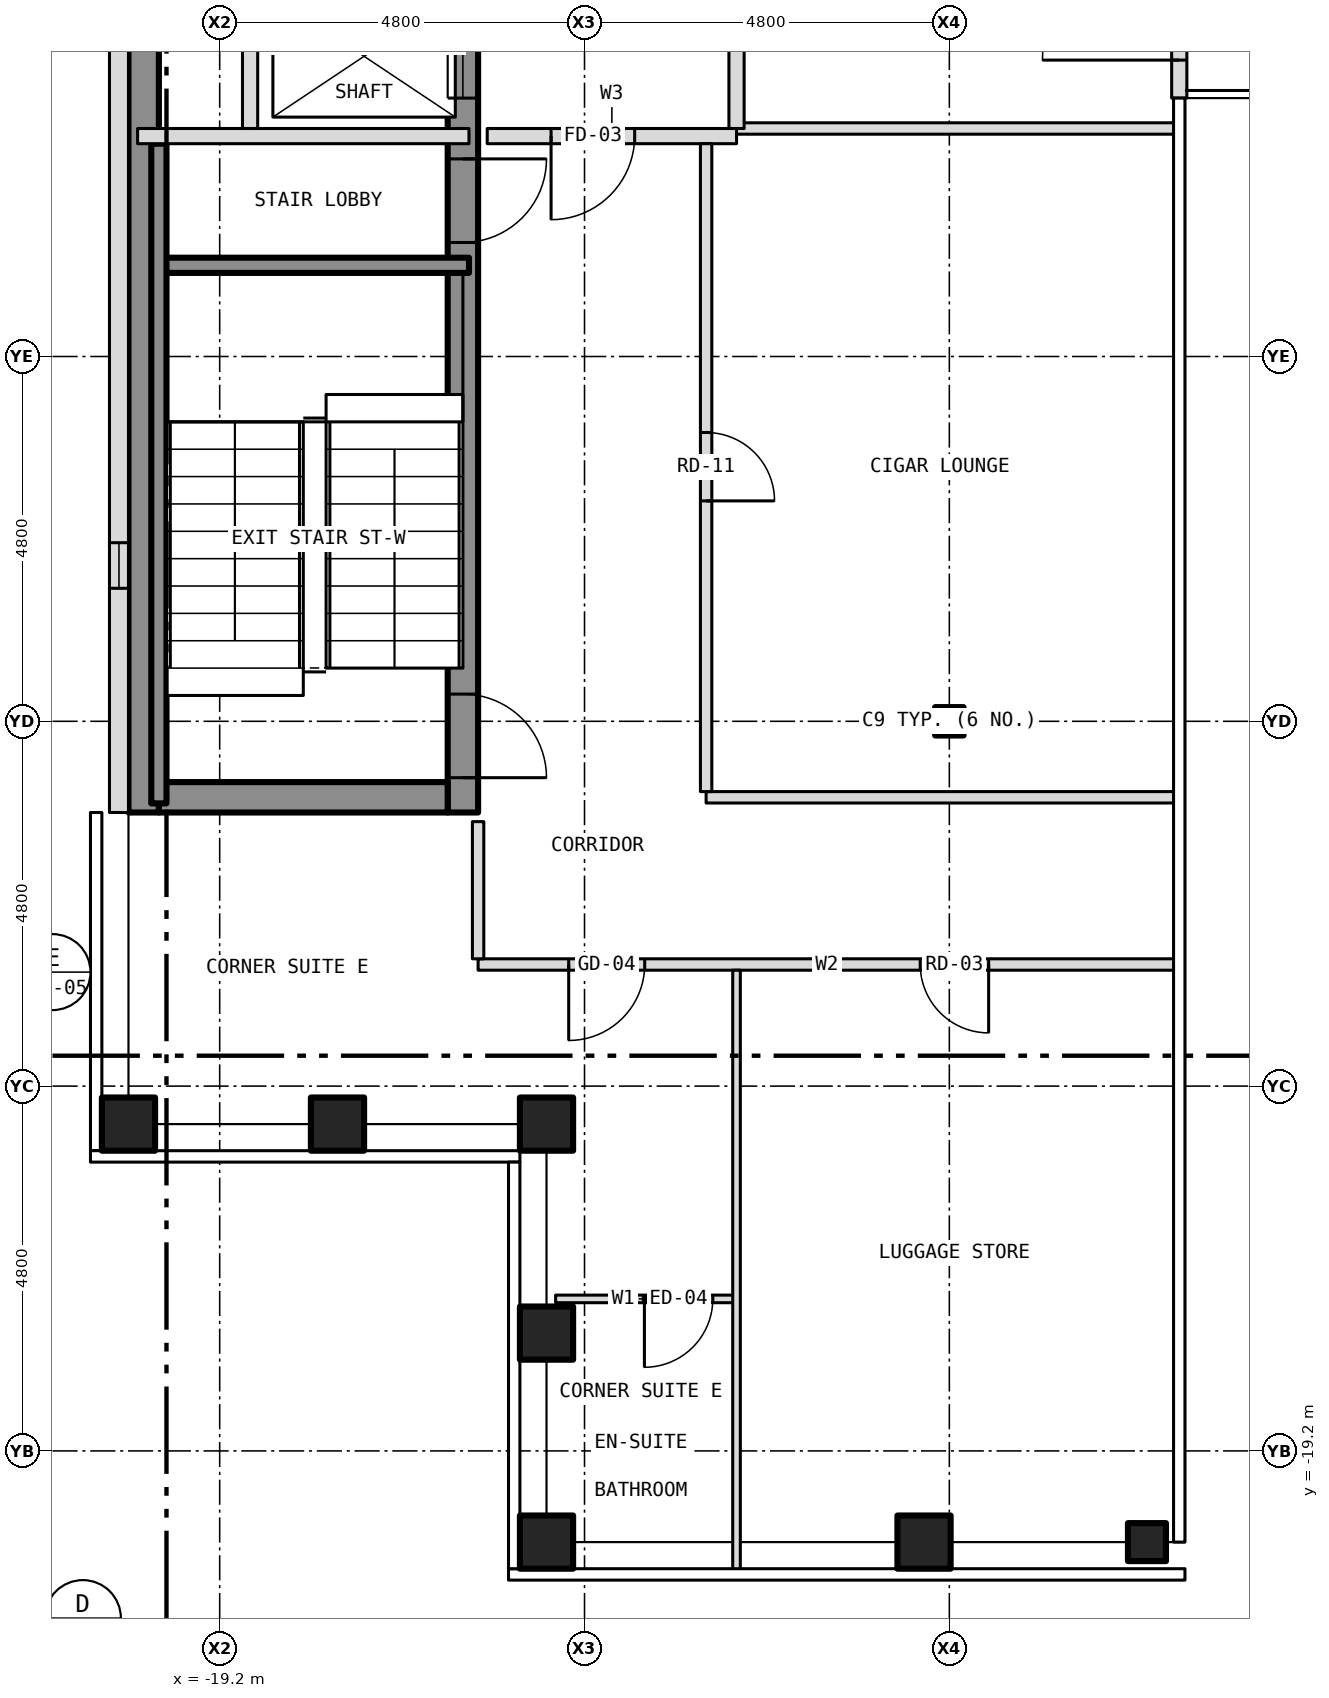
"""IFC4 building model, lengths in metres.
Left out: names, types, materials, properties, quantities, classifications, styles, units other than length and angle.
Written with IfcOpenShell. Run it as: python <this file> out.ifc"""

import sys

from ifc_helpers import new_model, si_unit, direction, frame, frame_2d, origin, origin_2d, place, context, subcontext, project, spatial, rectangle, hollow_rectangle, i_section, extrude, element, fill, save


model = new_model("IFC4")
c1 = context("Model", 3, precision=1e-05, world=origin(), true_north=direction((0.0, 1.0)))
c2 = subcontext(c1, "Body", "Model", "MODEL_VIEW")
j1 = project(units=[si_unit("LENGTHUNIT", "METRE"), si_unit("PLANEANGLEUNIT", "RADIAN")], contexts=[c1])
p1 = place(None, origin())
s1 = spatial("IfcSite", under=j1, at=p1, CompositionType="ELEMENT")
p2 = place(p1, origin())
s2 = spatial("IfcBuilding", under=s1, at=p2, CompositionType="ELEMENT")
p3 = place(p2, frame((0.0, 0.0, 229.5)))
s3 = spatial("IfcBuildingStorey", under=s2, at=p3, CompositionType="ELEMENT", Elevation=229.5)
for number, where, z_axis, x_axis in (
    (1, (-14.9, -20.4, -0.15), (0.0, 0.0, 1.0), (1.0, 0.0, 0.0)),
    (2, (-9.933, -20.4, -0.15), (0.0, 0.0, 1.0), (1.0, 0.0, 0.0)),
    (3, (-20.4, -14.9, -0.15), (0.0, 0.0, 1.0), (1.0, 0.0, 0.0)),
    (4, (-14.9, -14.9, -0.15), (0.0, 0.0, 1.0), (1.0, 0.0, 0.0)),
    (5, (-14.9, -17.65, -0.15), (0.0, 0.0, 1.0), (1.0, 0.0, 0.0)),
    (6, (-17.65, -14.9, -0.15), (0.0, 0.0, 1.0), (1.0, 0.0, 0.0)),
):
    element("IfcColumn", number, at=place(p3, frame(where, z_axis=z_axis, x_axis=x_axis)), inside=s3, PredefinedType="COLUMN", context=c2, shape_type="SweptSolid", body=[
        extrude(hollow_rectangle(XDim=0.7, YDim=0.7, WallThickness=0.04, at=origin_2d()), origin(), (0.0, 0.0, 1.0), 3.5),
    ])
p4 = place(p3, frame((-7.0, -20.4, -0.15), z_axis=(0.0, 0.0, 1.0), x_axis=(1.0, 0.0, 0.0)))
e7 = element("IfcColumn", 7, at=p4, inside=s3, PredefinedType="COLUMN", context=c2, shape_type="SweptSolid", body=[
    extrude(hollow_rectangle(XDim=0.5, YDim=0.5, WallThickness=0.03, at=origin_2d()), origin(), (0.0, 0.0, 1.0), 3.5),
])
p5 = place(p3, frame((-9.6, -9.6, -0.15), z_axis=(0.0, 0.0, 1.0), x_axis=(1.0, 0.0, 0.0)))
e8 = element("IfcColumn", 8, at=p5, inside=s3, PredefinedType="COLUMN", context=c2, shape_type="SweptSolid", body=[
    extrude(i_section(OverallWidth=0.373, OverallDepth=0.373, WebThickness=0.016, FlangeThickness=0.026, at=origin_2d()), origin(), (0.0, 0.0, 1.0), 3.5),
])
p6 = place(p3, frame((-16.0, -10.8, 0.0), z_axis=(0.0, 0.0, 1.0), x_axis=(0.0, 1.0, 0.0)))
e9 = element("IfcWall", 9, at=p6, inside=s3, PredefinedType="SHEAR", context=c2, shape_type="SweptSolid", body=[
    extrude(rectangle(XDim=21.6, YDim=0.4, at=frame_2d((10.8, 0.0))), origin(), (0.0, 0.0, 1.0), 3.25),
])
p7 = place(p6, frame((9.4, 0.0, 0.0)))
e10 = element("IfcOpeningElement", 10, at=p7, cuts=e9, PredefinedType="OPENING", context=c2, shape_type="SweptSolid", body=[
    extrude(rectangle(XDim=1.1, YDim=2.1, at=frame_2d((0.55, 1.05))), frame((0.0, 0.212, 0.0), z_axis=(0.0, -1.0, 0.0), x_axis=(1.0, 0.0, 0.0)), (0.0, 0.0, 1.0), 0.424),
])
p8 = place(p6, frame((11.5, 0.0, 0.0)))
e11 = element("IfcOpeningElement", 11, at=p8, cuts=e9, PredefinedType="OPENING", context=c2, shape_type="SweptSolid", body=[
    extrude(rectangle(XDim=1.1, YDim=2.1, at=frame_2d((0.55, 1.05))), frame((0.0, 0.212, 0.0), z_axis=(0.0, -1.0, 0.0), x_axis=(1.0, 0.0, 0.0)), (0.0, 0.0, 1.0), 0.424),
])
p9 = place(p6, frame((13.6, 0.0, 0.0)))
e12 = element("IfcOpeningElement", 12, at=p9, cuts=e9, PredefinedType="OPENING", context=c2, shape_type="SweptSolid", body=[
    extrude(rectangle(XDim=1.1, YDim=2.1, at=frame_2d((0.55, 1.05))), frame((0.0, 0.212, 0.0), z_axis=(0.0, -1.0, 0.0), x_axis=(1.0, 0.0, 0.0)), (0.0, 0.0, 1.0), 0.424),
])
p10 = place(p6, frame((15.7, 0.0, 0.0)))
e13 = element("IfcOpeningElement", 13, at=p10, cuts=e9, PredefinedType="OPENING", context=c2, shape_type="SweptSolid", body=[
    extrude(rectangle(XDim=1.1, YDim=2.1, at=frame_2d((0.55, 1.05))), frame((0.0, 0.212, 0.0), z_axis=(0.0, -1.0, 0.0), x_axis=(1.0, 0.0, 0.0)), (0.0, 0.0, 1.0), 0.424),
])
p11 = place(p6, frame((17.8, 0.0, 0.0)))
e14 = element("IfcOpeningElement", 14, at=p11, cuts=e9, PredefinedType="OPENING", context=c2, shape_type="SweptSolid", body=[
    extrude(rectangle(XDim=1.1, YDim=2.1, at=frame_2d((0.55, 1.05))), frame((0.0, 0.212, 0.0), z_axis=(0.0, -1.0, 0.0), x_axis=(1.0, 0.0, 0.0)), (0.0, 0.0, 1.0), 0.424),
])
p12 = place(p6, frame((0.458, 0.0, 0.0)))
e15 = element("IfcOpeningElement", 15, at=p12, cuts=e9, PredefinedType="OPENING", context=c2, shape_type="SweptSolid", body=[
    extrude(rectangle(XDim=1.1, YDim=2.1, at=frame_2d((0.55, 1.05))), frame((0.0, 0.212, 0.0), z_axis=(0.0, -1.0, 0.0), x_axis=(1.0, 0.0, 0.0)), (0.0, 0.0, 1.0), 0.424),
])
p13 = place(p6, frame((7.5, 0.0, 0.0)))
e16 = element("IfcOpeningElement", 16, at=p13, cuts=e9, PredefinedType="OPENING", context=c2, shape_type="SweptSolid", body=[
    extrude(rectangle(XDim=1.1, YDim=2.1, at=frame_2d((0.55, 1.05))), frame((0.0, 0.212, 0.0), z_axis=(0.0, -1.0, 0.0), x_axis=(1.0, 0.0, 0.0)), (0.0, 0.0, 1.0), 0.424),
])
p14 = place(p6, frame((20.0, 0.0, 0.0)))
e17 = element("IfcOpeningElement", 17, at=p14, cuts=e9, PredefinedType="OPENING", context=c2, shape_type="SweptSolid", body=[
    extrude(rectangle(XDim=0.9, YDim=2.1, at=frame_2d((0.45, 1.05))), frame((0.0, 0.212, 0.0), z_axis=(0.0, -1.0, 0.0), x_axis=(1.0, 0.0, 0.0)), (0.0, 0.0, 1.0), 0.424),
])
p15 = place(p3, frame((-20.2, -10.8, 0.0), z_axis=(0.0, 0.0, 1.0), x_axis=(0.0, 1.0, 0.0)))
e18 = element("IfcWall", 18, at=p15, inside=s3, PredefinedType="SHEAR", context=c2, shape_type="SweptSolid", body=[
    extrude(rectangle(XDim=21.6, YDim=0.4, at=frame_2d((10.8, 0.0))), origin(), (0.0, 0.0, 1.0), 3.25),
])
p16 = place(p3, frame((-20.0, -10.6, 0.0), z_axis=(0.0, 0.0, 1.0), x_axis=(1.0, 0.0, 0.0)))
e19 = element("IfcWall", 19, at=p16, inside=s3, PredefinedType="SHEAR", context=c2, shape_type="SweptSolid", body=[
    extrude(rectangle(XDim=3.8, YDim=0.4, at=frame_2d((1.9, 0.0))), origin(), (0.0, 0.0, 1.0), 3.25),
])
p17 = place(p3, frame((-20.525, 10.8, 0.0), z_axis=(0.0, 0.0, 1.0), x_axis=(0.0, -1.0, 0.0)))
e20 = element("IfcWall", 20, at=p17, inside=s3, PredefinedType="SOLIDWALL", context=c2, shape_type="SweptSolid", body=[
    extrude(rectangle(XDim=21.6, YDim=0.25, at=frame_2d((10.8, 0.0))), origin(), (0.0, 0.0, 1.0), 3.5),
])
p18 = place(p17, frame((18.05, 0.0, 1.0)))
e21 = element("IfcOpeningElement", 21, at=p18, cuts=e20, PredefinedType="OPENING", context=c2, shape_type="SweptSolid", body=[
    extrude(rectangle(XDim=0.6, YDim=1.5, at=frame_2d((0.3, 0.75))), frame((0.0, 0.137, 0.0), z_axis=(0.0, -1.0, 0.0), x_axis=(1.0, 0.0, 0.0)), (0.0, 0.0, 1.0), 0.274),
])
p19 = place(p3, frame((-6.575, -1.4, 0.0), z_axis=(0.0, 0.0, 1.0), x_axis=(0.0, 1.0, 0.0)))
e22 = element("IfcWall", 22, at=p19, inside=s3, PredefinedType="SOLIDWALL", context=c2, shape_type="SweptSolid", body=[
    extrude(rectangle(XDim=2.8, YDim=0.2, at=frame_2d((1.4, 0.0))), origin(), (0.0, 0.0, 1.0), 3.5),
])
p20 = place(p19, frame((0.5, 0.0, 0.0)))
e23 = element("IfcOpeningElement", 23, at=p20, cuts=e22, PredefinedType="OPENING", context=c2, shape_type="SweptSolid", body=[
    extrude(rectangle(XDim=1.8, YDim=2.1, at=frame_2d((0.9, 1.05))), frame((0.0, 0.112, 0.0), z_axis=(0.0, -1.0, 0.0), x_axis=(1.0, 0.0, 0.0)), (0.0, 0.0, 1.0), 0.224),
])
p21 = place(p3, frame((-14.78, -17.2, 0.0), z_axis=(0.0, 0.0, 1.0), x_axis=(1.0, 0.0, 0.0)))
e24 = element("IfcWall", 24, at=p21, inside=s3, PredefinedType="PARTITIONING", context=c2, shape_type="SweptSolid", body=[
    extrude(rectangle(XDim=2.38, YDim=0.1, at=frame_2d((1.19, 0.0))), origin(), (0.0, 0.0, 1.0), 3.35),
])
p22 = place(p21, frame((1.168, 0.0, 0.0)))
e25 = element("IfcOpeningElement", 25, at=p22, cuts=e24, PredefinedType="OPENING", context=c2, shape_type="SweptSolid", body=[
    extrude(rectangle(XDim=0.9, YDim=2.1, at=frame_2d((0.45, 1.05))), frame((0.0, 0.062, 0.0), z_axis=(0.0, -1.0, 0.0), x_axis=(1.0, 0.0, 0.0)), (0.0, 0.0, 1.0), 0.124),
])
p23 = place(p3, frame((-15.8, -12.8, 0.0), z_axis=(0.0, 0.0, 1.0), x_axis=(1.0, 0.0, 0.0)))
e26 = element("IfcWall", 26, at=p23, inside=s3, PredefinedType="PARTITIONING", context=c2, shape_type="SweptSolid", body=[
    extrude(rectangle(XDim=9.18, YDim=0.15, at=frame_2d((4.59, 0.0))), origin(), (0.0, 0.0, 1.0), 3.35),
])
p24 = place(p23, frame((5.817, 0.0, 0.0)))
e27 = element("IfcOpeningElement", 27, at=p24, cuts=e26, PredefinedType="OPENING", context=c2, shape_type="SweptSolid", body=[
    extrude(rectangle(XDim=0.9, YDim=2.1, at=frame_2d((0.45, 1.05))), frame((0.0, 0.087, 0.0), z_axis=(0.0, -1.0, 0.0), x_axis=(1.0, 0.0, 0.0)), (0.0, 0.0, 1.0), 0.174),
])
p25 = place(p23, frame((1.192, 0.0, 0.0)))
e28 = element("IfcOpeningElement", 28, at=p25, cuts=e26, PredefinedType="OPENING", context=c2, shape_type="SweptSolid", body=[
    extrude(rectangle(XDim=1.0, YDim=2.1, at=frame_2d((0.5, 1.05))), frame((0.0, 0.087, 0.0), z_axis=(0.0, -1.0, 0.0), x_axis=(1.0, 0.0, 0.0)), (0.0, 0.0, 1.0), 0.174),
])
p26 = place(p3, frame((-12.8, -10.6, 0.0), z_axis=(0.0, 0.0, 1.0), x_axis=(1.0, 0.0, 0.0)))
e29 = element("IfcWall", 29, at=p26, inside=s3, PredefinedType="PARTITIONING", context=c2, shape_type="SweptSolid", body=[
    extrude(rectangle(XDim=6.18, YDim=0.15, at=frame_2d((3.09, 0.0))), origin(), (0.0, 0.0, 1.0), 3.35),
])
p27 = place(p3, frame((-20.0, -3.6, 0.0), z_axis=(0.0, 0.0, 1.0), x_axis=(1.0, 0.0, 0.0)))
e30 = element("IfcWall", 30, at=p27, inside=s3, PredefinedType="SHEAR", context=c2, shape_type="SweptSolid", body=[
    extrude(rectangle(XDim=4.08, YDim=0.2, at=frame_2d((2.04, 0.0))), origin(), (0.0, 0.0, 1.0), 3.25),
])
p28 = place(p3, frame((-20.28, -1.9, 0.0), z_axis=(0.0, 0.0, 1.0), x_axis=(1.0, 0.0, 0.0)))
e31 = element("IfcWall", 31, at=p28, inside=s3, PredefinedType="PARTITIONING", context=c2, shape_type="SweptSolid", body=[
    extrude(rectangle(XDim=4.36, YDim=0.2, at=frame_2d((2.18, 0.0))), origin(), (0.0, 0.0, 1.0), 3.25),
])
p29 = place(p3, frame((-15.68, -1.9, 0.0), z_axis=(0.0, 0.0, 1.0), x_axis=(1.0, 0.0, 0.0)))
e32 = element("IfcWall", 32, at=p29, inside=s3, PredefinedType="PARTITIONING", context=c2, shape_type="SweptSolid", body=[
    extrude(rectangle(XDim=3.28, YDim=0.2, at=frame_2d((1.64, 0.0))), origin(), (0.0, 0.0, 1.0), 3.35),
])
p30 = place(p29, frame((0.84, 0.0, 0.0)))
e33 = element("IfcOpeningElement", 33, at=p30, cuts=e32, PredefinedType="OPENING", context=c2, shape_type="SweptSolid", body=[
    extrude(rectangle(XDim=1.1, YDim=2.1, at=frame_2d((0.55, 1.05))), frame((0.0, 0.112, 0.0), z_axis=(0.0, -1.0, 0.0), x_axis=(1.0, 0.0, 0.0)), (0.0, 0.0, 1.0), 0.224),
])
p31 = place(p3, frame((-12.4, -1.8, 0.0), z_axis=(0.0, 0.0, 1.0), x_axis=(1.0, 0.0, 0.0)))
e34 = element("IfcWall", 34, at=p31, inside=s3, PredefinedType="PARTITIONING", context=c2, shape_type="SweptSolid", body=[
    extrude(rectangle(XDim=5.78, YDim=0.15, at=frame_2d((2.89, 0.0))), origin(), (0.0, 0.0, 1.0), 3.35),
])
p32 = place(p3, frame((-20.0, -10.68, 0.0), z_axis=(0.0, 0.0, 1.0), x_axis=(0.0, 1.0, 0.0)))
e35 = element("IfcWall", 35, at=p32, inside=s3, PredefinedType="SHEAR", context=c2, shape_type="SweptSolid", body=[
    extrude(rectangle(XDim=8.68, YDim=0.2, at=frame_2d((4.34, 0.0))), origin(), (0.0, 0.0, 1.0), 3.25),
])
p33 = place(p3, frame((-18.8, -1.8, 0.0), z_axis=(0.0, 0.0, 1.0), x_axis=(0.0, 1.0, 0.0)))
e36 = element("IfcWall", 36, at=p33, inside=s3, PredefinedType="PARTITIONING", context=c2, shape_type="SweptSolid", body=[
    extrude(rectangle(XDim=12.48, YDim=0.2, at=frame_2d((6.24, 0.0))), origin(), (0.0, 0.0, 1.0), 3.25),
])
p34 = place(p3, frame((-15.8, -12.725, 0.0), z_axis=(0.0, 0.0, 1.0), x_axis=(0.0, 1.0, 0.0)))
e37 = element("IfcWall", 37, at=p34, inside=s3, PredefinedType="PARTITIONING", context=c2, shape_type="SweptSolid", body=[
    extrude(rectangle(XDim=1.805, YDim=0.15, at=frame_2d((0.903, 0.0))), origin(), (0.0, 0.0, 1.0), 3.35),
])
p35 = place(p3, frame((-12.8, -10.525, 0.0), z_axis=(0.0, 0.0, 1.0), x_axis=(0.0, 1.0, 0.0)))
e38 = element("IfcWall", 38, at=p35, inside=s3, PredefinedType="PARTITIONING", context=c2, shape_type="SweptSolid", body=[
    extrude(rectangle(XDim=8.525, YDim=0.15, at=frame_2d((4.262, 0.0))), origin(), (0.0, 0.0, 1.0), 3.35),
])
p36 = place(p35, frame((3.825, 0.0, 0.0)))
e39 = element("IfcOpeningElement", 39, at=p36, cuts=e38, PredefinedType="OPENING", context=c2, shape_type="SweptSolid", body=[
    extrude(rectangle(XDim=0.9, YDim=2.1, at=frame_2d((0.45, 1.05))), frame((0.0, 0.087, 0.0), z_axis=(0.0, -1.0, 0.0), x_axis=(1.0, 0.0, 0.0)), (0.0, 0.0, 1.0), 0.174),
])
p37 = place(p3, frame((-12.4, -20.78, 0.0), z_axis=(0.0, 0.0, 1.0), x_axis=(0.0, 1.0, 0.0)))
e40 = element("IfcWall", 40, at=p37, inside=s3, PredefinedType="PARTITIONING", context=c2, shape_type="SweptSolid", body=[
    extrude(rectangle(XDim=7.905, YDim=0.1, at=frame_2d((3.953, 0.0))), origin(), (0.0, 0.0, 1.0), 3.35),
])
p38 = place(p3, frame((-12.4, -1.8, 0.0), z_axis=(0.0, 0.0, 1.0), x_axis=(0.0, 1.0, 0.0)))
e41 = element("IfcWall", 41, at=p38, inside=s3, PredefinedType="PARTITIONING", context=c2, shape_type="SweptSolid", body=[
    extrude(rectangle(XDim=4.0, YDim=0.2, at=frame_2d((2.0, 0.0))), origin(), (0.0, 0.0, 1.0), 3.35),
])
p39 = place(p38, frame((1.25, 0.0, 0.0)))
e42 = element("IfcOpeningElement", 42, at=p39, cuts=e41, PredefinedType="OPENING", context=c2, shape_type="SweptSolid", body=[
    extrude(rectangle(XDim=1.1, YDim=2.1, at=frame_2d((0.55, 1.05))), frame((0.0, 0.112, 0.0), z_axis=(0.0, -1.0, 0.0), x_axis=(1.0, 0.0, 0.0)), (0.0, 0.0, 1.0), 0.224),
])
p40 = place(p18, origin())
e43 = element("IfcWindow", 43, at=p40, inside=s3, PartitioningType="SINGLE_PANEL", PredefinedType="WINDOW", context=c2, shape_type="SweptSolid", body=[
    extrude(rectangle(XDim=0.6, YDim=1.5, at=frame_2d((0.3, 0.75))), frame((0.0, -0.035, 0.0), z_axis=(0.0, -1.0, 0.0), x_axis=(1.0, 0.0, 0.0)), (0.0, 0.0, 1.0), 0.06),
])
fill(e21, e43)
p41 = place(p20, origin())
e44 = element("IfcDoor", 44, at=p41, inside=s3, OperationType="DOUBLE_DOOR_DOUBLE_SWING", PredefinedType="DOOR", context=c2, shape_type="SweptSolid", body=[
    extrude(rectangle(XDim=1.8, YDim=2.1, at=frame_2d((0.9, 1.05))), frame((0.0, 0.025, 0.0), z_axis=(0.0, -1.0, 0.0), x_axis=(1.0, 0.0, 0.0)), (0.0, 0.0, 1.0), 0.05),
])
fill(e23, e44)
p42 = place(p7, origin())
e45 = element("IfcDoor", 45, at=p42, inside=s3, OperationType="SLIDING_TO_LEFT", PredefinedType="DOOR", context=c2, shape_type="SweptSolid", body=[
    extrude(rectangle(XDim=1.1, YDim=2.1, at=frame_2d((0.55, 1.05))), frame((0.0, 0.025, 0.0), z_axis=(0.0, -1.0, 0.0), x_axis=(1.0, 0.0, 0.0)), (0.0, 0.0, 1.0), 0.05),
])
fill(e10, e45)
p43 = place(p12, origin())
e46 = element("IfcDoor", 46, at=p43, inside=s3, OperationType="SINGLE_SWING_LEFT", PredefinedType="DOOR", context=c2, shape_type="SweptSolid", body=[
    extrude(rectangle(XDim=1.1, YDim=2.1, at=frame_2d((0.55, 1.05))), frame((0.0, 0.025, 0.0), z_axis=(0.0, -1.0, 0.0), x_axis=(1.0, 0.0, 0.0)), (0.0, 0.0, 1.0), 0.05),
])
fill(e15, e46)
p44 = place(p13, origin())
e47 = element("IfcDoor", 47, at=p44, inside=s3, OperationType="SINGLE_SWING_RIGHT", PredefinedType="DOOR", context=c2, shape_type="SweptSolid", body=[
    extrude(rectangle(XDim=1.1, YDim=2.1, at=frame_2d((0.55, 1.05))), frame((0.0, 0.025, 0.0), z_axis=(0.0, -1.0, 0.0), x_axis=(1.0, 0.0, 0.0)), (0.0, 0.0, 1.0), 0.05),
])
fill(e16, e47)
p45 = place(p30, origin())
e48 = element("IfcDoor", 48, at=p45, inside=s3, OperationType="SINGLE_SWING_LEFT", PredefinedType="DOOR", context=c2, shape_type="SweptSolid", body=[
    extrude(rectangle(XDim=1.1, YDim=2.1, at=frame_2d((0.55, 1.05))), frame((0.0, 0.025, 0.0), z_axis=(0.0, -1.0, 0.0), x_axis=(1.0, 0.0, 0.0)), (0.0, 0.0, 1.0), 0.05),
])
fill(e33, e48)
p46 = place(p24, origin())
e49 = element("IfcDoor", 49, at=p46, inside=s3, OperationType="SINGLE_SWING_RIGHT", PredefinedType="DOOR", context=c2, shape_type="SweptSolid", body=[
    extrude(rectangle(XDim=0.9, YDim=2.1, at=frame_2d((0.45, 1.05))), frame((0.0, 0.025, 0.0), z_axis=(0.0, -1.0, 0.0), x_axis=(1.0, 0.0, 0.0)), (0.0, 0.0, 1.0), 0.05),
])
fill(e27, e49)
p47 = place(p22, origin())
e50 = element("IfcDoor", 50, at=p47, inside=s3, OperationType="SINGLE_SWING_LEFT", PredefinedType="DOOR", context=c2, shape_type="SweptSolid", body=[
    extrude(rectangle(XDim=0.9, YDim=2.1, at=frame_2d((0.45, 1.05))), frame((0.0, 0.025, 0.0), z_axis=(0.0, -1.0, 0.0), x_axis=(1.0, 0.0, 0.0)), (0.0, 0.0, 1.0), 0.05),
])
fill(e25, e50)
p48 = place(p25, origin())
e51 = element("IfcDoor", 51, at=p48, inside=s3, OperationType="SINGLE_SWING_LEFT", PredefinedType="DOOR", context=c2, shape_type="SweptSolid", body=[
    extrude(rectangle(XDim=1.0, YDim=2.1, at=frame_2d((0.5, 1.05))), frame((0.0, 0.025, 0.0), z_axis=(0.0, -1.0, 0.0), x_axis=(1.0, 0.0, 0.0)), (0.0, 0.0, 1.0), 0.05),
])
fill(e28, e51)
p49 = place(p36, origin())
e52 = element("IfcDoor", 52, at=p49, inside=s3, OperationType="SINGLE_SWING_LEFT", PredefinedType="DOOR", context=c2, shape_type="SweptSolid", body=[
    extrude(rectangle(XDim=0.9, YDim=2.1, at=frame_2d((0.45, 1.05))), frame((0.0, 0.025, 0.0), z_axis=(0.0, -1.0, 0.0), x_axis=(1.0, 0.0, 0.0)), (0.0, 0.0, 1.0), 0.05),
])
fill(e39, e52)
save(model, sys.argv[1])
